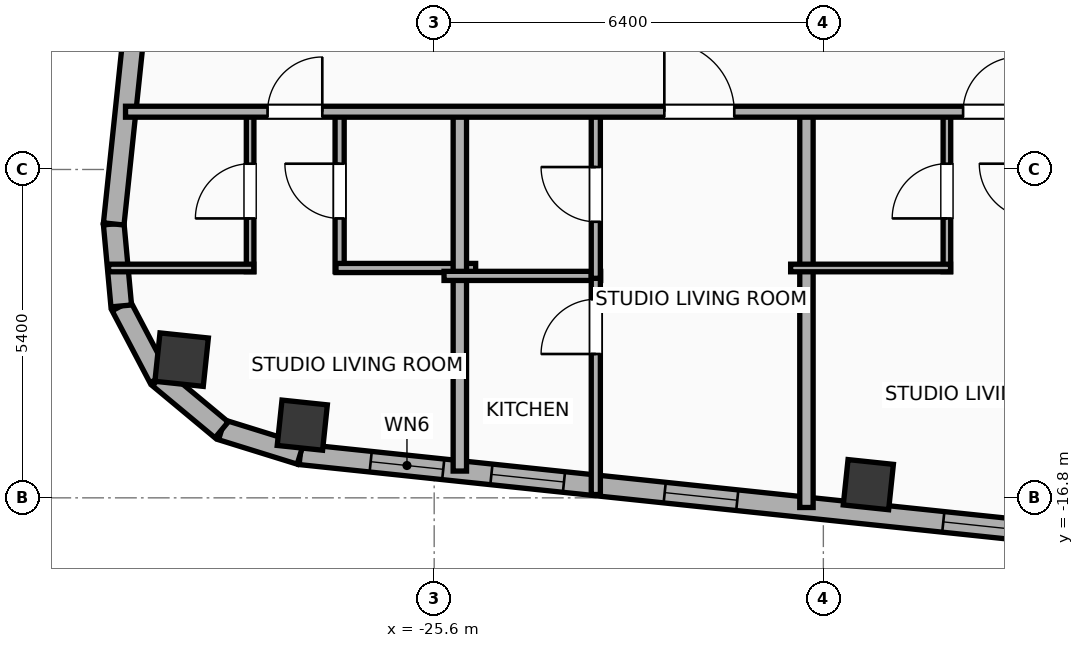
"""IFC4 building model, lengths in metres.
Left out: names, types, materials, properties, quantities, classifications, styles, units other than length and angle.
Written with IfcOpenShell. Run it as: python <this file> out.ifc"""

import sys

from ifc_helpers import new_model, si_unit, direction, frame, frame_2d, origin, origin_2d, place, context, subcontext, project, spatial, rectangle, hollow_rectangle, hollow_circle, extrude, element, fill, save


model = new_model("IFC4")
c1 = context("Model", 3, precision=1e-05, world=origin(), true_north=direction((0.0, 1.0)))
c2 = subcontext(c1, "Body", "Model", "MODEL_VIEW")
j1 = project(units=[si_unit("LENGTHUNIT", "METRE"), si_unit("PLANEANGLEUNIT", "RADIAN")], contexts=[c1])
p1 = place(None, origin())
s1 = spatial("IfcSite", under=j1, at=p1, CompositionType="ELEMENT")
p2 = place(p1, origin())
s2 = spatial("IfcBuilding", under=s1, at=p2, CompositionType="ELEMENT")
p3 = place(p2, frame((0.0, 0.0, 306.8)))
s3 = spatial("IfcBuildingStorey", under=s2, at=p3, CompositionType="ELEMENT", Elevation=306.8)
for number, where, z_axis, x_axis in (
    (1, (-27.769, -15.604, 0.0), (0.0, 0.0, 1.0), (0.995, -0.105, 0.0)),
    (2, (-18.46, -16.583, 0.0), (0.0, 0.0, 1.0), (0.995, -0.105, 0.0)),
):
    element("IfcColumn", number, at=place(p3, frame(where, z_axis=z_axis, x_axis=x_axis)), inside=s3, PredefinedType="COLUMN", context=c2, shape_type="SweptSolid", body=[
        extrude(hollow_rectangle(XDim=0.75, YDim=0.75, WallThickness=0.025, at=origin_2d()), origin(), (0.0, 0.0, 1.0), 3.865),
    ])
p4 = place(p3, frame((-29.753, -14.527, 0.0), z_axis=(0.0, 0.0, 1.0), x_axis=(0.994521895368, -0.104528463268, 0.0)))
e3 = element("IfcColumn", 3, at=p4, inside=s3, PredefinedType="COLUMN", context=c2, shape_type="SweptSolid", body=[
    extrude(hollow_circle(Radius=0.4, WallThickness=0.028, at=origin_2d()), origin(), (0.0, 0.0, 1.0), 3.865),
])
p5 = place(p3, frame((18.708, -20.972, 0.0), z_axis=(0.0, 0.0, 1.0), x_axis=(-0.994521888554, 0.104528528102, 0.0)))
e4 = element("IfcWall", 4, at=p5, inside=s3, PredefinedType="ELEMENTEDWALL", context=c2, shape_type="SweptSolid", body=[
    extrude(rectangle(XDim=46.766, YDim=0.34, at=frame_2d((23.383, 0.0))), origin(), (0.0, 0.0, 1.0), 2.39),
])
p6 = place(p5, frame((23.733, 0.0, 0.65)))
e5 = element("IfcOpeningElement", 5, at=p6, cuts=e4, PredefinedType="OPENING", context=c2, shape_type="SweptSolid", body=[
    extrude(rectangle(XDim=2.6, YDim=1.45, at=frame_2d((1.3, 0.725))), frame((0.0, 0.18, 0.0), z_axis=(0.0, -1.0, 0.0), x_axis=(1.0, 0.0, 0.0)), (0.0, 0.0, 1.0), 0.36),
])
p7 = place(p5, frame((44.402, 0.0, 0.55)))
e6 = element("IfcOpeningElement", 6, at=p7, cuts=e4, PredefinedType="OPENING", context=c2, shape_type="SweptSolid", body=[
    extrude(rectangle(XDim=1.2, YDim=1.15, at=frame_2d((0.6, 0.575))), frame((0.0, 0.18, 0.0), z_axis=(0.0, -1.0, 0.0), x_axis=(1.0, 0.0, 0.0)), (0.0, 0.0, 1.0), 0.36),
])
p8 = place(p5, frame((39.54, 0.0, 0.55)))
e7 = element("IfcOpeningElement", 7, at=p8, cuts=e4, PredefinedType="OPENING", context=c2, shape_type="SweptSolid", body=[
    extrude(rectangle(XDim=1.2, YDim=1.15, at=frame_2d((0.6, 0.575))), frame((0.0, 0.18, 0.0), z_axis=(0.0, -1.0, 0.0), x_axis=(1.0, 0.0, 0.0)), (0.0, 0.0, 1.0), 0.36),
])
p9 = place(p5, frame((42.406, 0.0, 0.55)))
e8 = element("IfcOpeningElement", 8, at=p9, cuts=e4, PredefinedType="OPENING", context=c2, shape_type="SweptSolid", body=[
    extrude(rectangle(XDim=1.2, YDim=1.15, at=frame_2d((0.6, 0.575))), frame((0.0, 0.18, 0.0), z_axis=(0.0, -1.0, 0.0), x_axis=(1.0, 0.0, 0.0)), (0.0, 0.0, 1.0), 0.36),
])
p10 = place(p5, frame((34.933, 0.0, 0.55)))
e9 = element("IfcOpeningElement", 9, at=p10, cuts=e4, PredefinedType="OPENING", context=c2, shape_type="SweptSolid", body=[
    extrude(rectangle(XDim=1.2, YDim=1.15, at=frame_2d((0.6, 0.575))), frame((0.0, 0.18, 0.0), z_axis=(0.0, -1.0, 0.0), x_axis=(1.0, 0.0, 0.0)), (0.0, 0.0, 1.0), 0.36),
])
p11 = place(p5, frame((28.631, 0.0, 0.55)))
e10 = element("IfcOpeningElement", 10, at=p11, cuts=e4, PredefinedType="OPENING", context=c2, shape_type="SweptSolid", body=[
    extrude(rectangle(XDim=1.2, YDim=1.15, at=frame_2d((0.6, 0.575))), frame((0.0, 0.18, 0.0), z_axis=(0.0, -1.0, 0.0), x_axis=(1.0, 0.0, 0.0)), (0.0, 0.0, 1.0), 0.36),
])
p12 = place(p5, frame((30.896, 0.0, 0.55)))
e11 = element("IfcOpeningElement", 11, at=p12, cuts=e4, PredefinedType="OPENING", context=c2, shape_type="SweptSolid", body=[
    extrude(rectangle(XDim=1.2, YDim=1.15, at=frame_2d((0.6, 0.575))), frame((0.0, 0.18, 0.0), z_axis=(0.0, -1.0, 0.0), x_axis=(1.0, 0.0, 0.0)), (0.0, 0.0, 1.0), 0.36),
])
p13 = place(p5, frame((7.501, 0.0, 0.55)))
e12 = element("IfcOpeningElement", 12, at=p13, cuts=e4, PredefinedType="OPENING", context=c2, shape_type="SweptSolid", body=[
    extrude(rectangle(XDim=1.2, YDim=1.15, at=frame_2d((0.6, 0.575))), frame((0.0, 0.18, 0.0), z_axis=(0.0, -1.0, 0.0), x_axis=(1.0, 0.0, 0.0)), (0.0, 0.0, 1.0), 0.36),
])
p14 = place(p5, frame((4.159, 0.0, 0.55)))
e13 = element("IfcOpeningElement", 13, at=p14, cuts=e4, PredefinedType="OPENING", context=c2, shape_type="SweptSolid", body=[
    extrude(rectangle(XDim=1.2, YDim=1.15, at=frame_2d((0.6, 0.575))), frame((0.0, 0.18, 0.0), z_axis=(0.0, -1.0, 0.0), x_axis=(1.0, 0.0, 0.0)), (0.0, 0.0, 1.0), 0.36),
])
p15 = place(p5, frame((1.369, 0.0, 0.55)))
e14 = element("IfcOpeningElement", 14, at=p15, cuts=e4, PredefinedType="OPENING", context=c2, shape_type="SweptSolid", body=[
    extrude(rectangle(XDim=1.2, YDim=1.15, at=frame_2d((0.6, 0.575))), frame((0.0, 0.18, 0.0), z_axis=(0.0, -1.0, 0.0), x_axis=(1.0, 0.0, 0.0)), (0.0, 0.0, 1.0), 0.36),
])
p16 = place(p5, frame((20.254, 0.0, 0.55)))
e15 = element("IfcOpeningElement", 15, at=p16, cuts=e4, PredefinedType="OPENING", context=c2, shape_type="SweptSolid", body=[
    extrude(rectangle(XDim=1.2, YDim=1.15, at=frame_2d((0.6, 0.575))), frame((0.0, 0.18, 0.0), z_axis=(0.0, -1.0, 0.0), x_axis=(1.0, 0.0, 0.0)), (0.0, 0.0, 1.0), 0.36),
])
p17 = place(p5, frame((16.172, 0.0, 0.55)))
e16 = element("IfcOpeningElement", 16, at=p17, cuts=e4, PredefinedType="OPENING", context=c2, shape_type="SweptSolid", body=[
    extrude(rectangle(XDim=1.2, YDim=1.15, at=frame_2d((0.6, 0.575))), frame((0.0, 0.18, 0.0), z_axis=(0.0, -1.0, 0.0), x_axis=(1.0, 0.0, 0.0)), (0.0, 0.0, 1.0), 0.36),
])
p18 = place(p5, frame((12.11, 0.0, 0.55)))
e17 = element("IfcOpeningElement", 17, at=p18, cuts=e4, PredefinedType="OPENING", context=c2, shape_type="SweptSolid", body=[
    extrude(rectangle(XDim=1.2, YDim=1.15, at=frame_2d((0.6, 0.575))), frame((0.0, 0.18, 0.0), z_axis=(0.0, -1.0, 0.0), x_axis=(1.0, 0.0, 0.0)), (0.0, 0.0, 1.0), 0.36),
])
p19 = place(p3, frame((-27.802, -16.084, 0.0), z_axis=(0.0, 0.0, 1.0), x_axis=(-0.955007802701, 0.296580674994, 0.0)))
e18 = element("IfcWall", 18, at=p19, inside=s3, PredefinedType="ELEMENTEDWALL", context=c2, shape_type="SweptSolid", body=[
    extrude(rectangle(XDim=1.354, YDim=0.34, at=frame_2d((0.677, 0.0))), origin(), (0.0, 0.0, 1.0), 2.39),
])
p20 = place(p3, frame((-29.096, -15.682, 0.0), z_axis=(0.0, 0.0, 1.0), x_axis=(-0.768864427906, 0.639411832469, 0.0)))
e19 = element("IfcWall", 19, at=p20, inside=s3, PredefinedType="ELEMENTEDWALL", context=c2, shape_type="SweptSolid", body=[
    extrude(rectangle(XDim=1.337, YDim=0.34, at=frame_2d((0.668, 0.0))), origin(), (0.0, 0.0, 1.0), 2.39),
])
p21 = place(p3, frame((-30.124, -14.827, 0.0), z_axis=(0.0, 0.0, 1.0), x_axis=(-0.465528132217, 0.885033083062, 0.0)))
e20 = element("IfcWall", 20, at=p21, inside=s3, PredefinedType="ELEMENTEDWALL", context=c2, shape_type="SweptSolid", body=[
    extrude(rectangle(XDim=1.337, YDim=0.34, at=frame_2d((0.668, 0.0))), origin(), (0.0, 0.0, 1.0), 3.5),
])
p22 = place(p3, frame((-30.746, -13.644, 0.0), z_axis=(0.0, 0.0, 1.0), x_axis=(-0.091592370975, 0.995796584438, 0.0)))
e21 = element("IfcWall", 21, at=p22, inside=s3, PredefinedType="ELEMENTEDWALL", context=c2, shape_type="SweptSolid", body=[
    extrude(rectangle(XDim=1.354, YDim=0.34, at=frame_2d((0.677, 0.0))), origin(), (0.0, 0.0, 1.0), 3.5),
])
p23 = place(p3, frame((-30.87, -12.296, 0.0), z_axis=(0.0, 0.0, 1.0), x_axis=(0.104533282919, 0.994521388791, 0.0)))
e22 = element("IfcWall", 22, at=p23, inside=s3, PredefinedType="ELEMENTEDWALL", context=c2, shape_type="SweptSolid", body=[
    extrude(rectangle(XDim=30.366, YDim=0.34, at=frame_2d((15.183, 0.0))), origin(), (0.0, 0.0, 1.0), 2.39),
])
p24 = place(p23, frame((5.442, 0.0, 0.65)))
e23 = element("IfcOpeningElement", 23, at=p24, cuts=e22, PredefinedType="OPENING", context=c2, shape_type="SweptSolid", body=[
    extrude(rectangle(XDim=2.6, YDim=1.45, at=frame_2d((1.3, 0.725))), frame((0.0, 0.18, 0.0), z_axis=(0.0, -1.0, 0.0), x_axis=(1.0, 0.0, 0.0)), (0.0, 0.0, 1.0), 0.36),
])
p25 = place(p23, frame((23.125, 0.0, 0.65)))
e24 = element("IfcOpeningElement", 24, at=p25, cuts=e22, PredefinedType="OPENING", context=c2, shape_type="SweptSolid", body=[
    extrude(rectangle(XDim=2.6, YDim=1.45, at=frame_2d((1.3, 0.725))), frame((0.0, 0.18, 0.0), z_axis=(0.0, -1.0, 0.0), x_axis=(1.0, 0.0, 0.0)), (0.0, 0.0, 1.0), 0.36),
])
p26 = place(p23, frame((27.192, 0.0, 0.55)))
e25 = element("IfcOpeningElement", 25, at=p26, cuts=e22, PredefinedType="OPENING", context=c2, shape_type="SweptSolid", body=[
    extrude(rectangle(XDim=1.2, YDim=1.15, at=frame_2d((0.6, 0.575))), frame((0.0, 0.18, 0.0), z_axis=(0.0, -1.0, 0.0), x_axis=(1.0, 0.0, 0.0)), (0.0, 0.0, 1.0), 0.36),
])
p27 = place(p23, frame((16.311, 0.0, 0.55)))
e26 = element("IfcOpeningElement", 26, at=p27, cuts=e22, PredefinedType="OPENING", context=c2, shape_type="SweptSolid", body=[
    extrude(rectangle(XDim=1.2, YDim=1.15, at=frame_2d((0.6, 0.575))), frame((0.0, 0.18, 0.0), z_axis=(0.0, -1.0, 0.0), x_axis=(1.0, 0.0, 0.0)), (0.0, 0.0, 1.0), 0.36),
])
p28 = place(p3, frame((-28.627, -13.08, 0.0), z_axis=(0.0, 0.0, 1.0), x_axis=(0.0, 1.0, 0.0)))
e27 = element("IfcWall", 27, at=p28, inside=s3, PredefinedType="PARTITIONING", context=c2, shape_type="SweptSolid", body=[
    extrude(rectangle(XDim=2.65, YDim=0.125, at=frame_2d((1.325, 0.0))), origin(), (0.0, 0.0, 1.0), 3.5),
])
p29 = place(p28, frame((0.875, 0.0, 0.0)))
e28 = element("IfcOpeningElement", 28, at=p29, cuts=e27, PredefinedType="OPENING", context=c2, shape_type="SweptSolid", body=[
    extrude(rectangle(XDim=0.9, YDim=2.05, at=frame_2d((0.45, 1.025))), frame((0.0, 0.073, 0.0), z_axis=(0.0, -1.0, 0.0), x_axis=(1.0, 0.0, 0.0)), (0.0, 0.0, 1.0), 0.145),
])
p30 = place(p3, frame((-27.155, -13.08, 0.0), z_axis=(0.0, 0.0, 1.0), x_axis=(0.0, 1.0, 0.0)))
e29 = element("IfcWall", 29, at=p30, inside=s3, PredefinedType="PLUMBINGWALL", context=c2, shape_type="SweptSolid", body=[
    extrude(rectangle(XDim=2.65, YDim=0.15, at=frame_2d((1.325, 0.0))), origin(), (0.0, 0.0, 1.0), 3.5),
])
p31 = place(p30, frame((0.875, 0.0, 0.0)))
e30 = element("IfcOpeningElement", 30, at=p31, cuts=e29, PredefinedType="OPENING", context=c2, shape_type="SweptSolid", body=[
    extrude(rectangle(XDim=0.9, YDim=2.05, at=frame_2d((0.45, 1.025))), frame((0.0, 0.085, 0.0), z_axis=(0.0, -1.0, 0.0), x_axis=(1.0, 0.0, 0.0)), (0.0, 0.0, 1.0), 0.17),
])
p32 = place(p3, frame((-30.954, -13.02, 0.0), z_axis=(0.0, 0.0, 1.0), x_axis=(1.0, 0.0, 0.0)))
e31 = element("IfcWall", 31, at=p32, inside=s3, PredefinedType="PARTITIONING", context=c2, shape_type="SweptSolid", body=[
    extrude(rectangle(XDim=2.387, YDim=0.125, at=frame_2d((1.194, 0.0))), origin(), (0.0, 0.0, 1.0), 3.5),
])
p33 = place(p3, frame((-27.215, -13.02, 0.0), z_axis=(0.0, 0.0, 1.0), x_axis=(1.0, 0.0, 0.0)))
e32 = element("IfcWall", 32, at=p33, inside=s3, PredefinedType="PLUMBINGWALL", context=c2, shape_type="SweptSolid", body=[
    extrude(rectangle(XDim=2.297, YDim=0.15, at=frame_2d((1.148, 0.0))), origin(), (0.0, 0.0, 1.0), 3.5),
])
p34 = place(p3, frame((-25.178, -16.36, 0.0), z_axis=(0.0, 0.0, 1.0), x_axis=(0.0, 1.0, 0.0)))
e33 = element("IfcWall", 33, at=p34, inside=s3, PredefinedType="PARTITIONING", context=c2, shape_type="SweptSolid", body=[
    extrude(rectangle(XDim=5.99, YDim=0.22, at=frame_2d((2.995, 0.0))), origin(), (0.0, 0.0, 1.0), 3.5),
])
p35 = place(p3, frame((-25.438, -13.15, 0.0), z_axis=(0.0, 0.0, 1.0), x_axis=(1.0, 0.0, 0.0)))
e34 = element("IfcWall", 34, at=p35, inside=s3, PredefinedType="PLUMBINGWALL", context=c2, shape_type="SweptSolid", body=[
    extrude(rectangle(XDim=2.576, YDim=0.15, at=frame_2d((1.288, 0.0))), origin(), (0.0, 0.0, 1.0), 3.5),
])
p36 = place(p3, frame((-22.942, -16.745, 0.0), z_axis=(0.0, 0.0, 1.0), x_axis=(0.0, 1.0, 0.0)))
e35 = element("IfcWall", 35, at=p36, inside=s3, PredefinedType="PLUMBINGWALL", context=c2, shape_type="SweptSolid", body=[
    extrude(rectangle(XDim=3.635, YDim=0.15, at=frame_2d((1.818, 0.0))), origin(), (0.0, 0.0, 1.0), 3.5),
])
p37 = place(p36, frame((2.311, 0.0, 0.0)))
e36 = element("IfcOpeningElement", 36, at=p37, cuts=e35, PredefinedType="OPENING", context=c2, shape_type="SweptSolid", body=[
    extrude(rectangle(XDim=0.9, YDim=2.05, at=frame_2d((0.45, 1.025))), frame((0.0, 0.085, 0.0), z_axis=(0.0, -1.0, 0.0), x_axis=(1.0, 0.0, 0.0)), (0.0, 0.0, 1.0), 0.17),
])
p38 = place(p3, frame((-22.942, -13.19, 0.0), z_axis=(0.0, 0.0, 1.0), x_axis=(0.0, 1.0, 0.0)))
e37 = element("IfcWall", 37, at=p38, inside=s3, PredefinedType="PLUMBINGWALL", context=c2, shape_type="SweptSolid", body=[
    extrude(rectangle(XDim=2.76, YDim=0.15, at=frame_2d((1.38, 0.0))), origin(), (0.0, 0.0, 1.0), 3.5),
])
p39 = place(p38, frame((0.93, 0.0, 0.0)))
e38 = element("IfcOpeningElement", 38, at=p39, cuts=e37, PredefinedType="OPENING", context=c2, shape_type="SweptSolid", body=[
    extrude(rectangle(XDim=0.9, YDim=2.05, at=frame_2d((0.45, 1.025))), frame((0.0, 0.085, 0.0), z_axis=(0.0, -1.0, 0.0), x_axis=(1.0, 0.0, 0.0)), (0.0, 0.0, 1.0), 0.17),
])
p40 = place(p3, frame((-19.478, -16.959, 0.0), z_axis=(0.0, 0.0, 1.0), x_axis=(0.0, 1.0, 0.0)))
e39 = element("IfcWall", 39, at=p40, inside=s3, PredefinedType="PARTITIONING", context=c2, shape_type="SweptSolid", body=[
    extrude(rectangle(XDim=6.589, YDim=0.22, at=frame_2d((3.294, 0.0))), origin(), (0.0, 0.0, 1.0), 3.5),
])
p41 = place(p3, frame((-17.168, -13.08, 0.0), z_axis=(0.0, 0.0, 1.0), x_axis=(0.0, 1.0, 0.0)))
e40 = element("IfcWall", 40, at=p41, inside=s3, PredefinedType="PARTITIONING", context=c2, shape_type="SweptSolid", body=[
    extrude(rectangle(XDim=2.65, YDim=0.125, at=frame_2d((1.325, 0.0))), origin(), (0.0, 0.0, 1.0), 3.5),
])
p42 = place(p41, frame((0.875, 0.0, 0.0)))
e41 = element("IfcOpeningElement", 41, at=p42, cuts=e40, PredefinedType="OPENING", context=c2, shape_type="SweptSolid", body=[
    extrude(rectangle(XDim=0.9, YDim=2.05, at=frame_2d((0.45, 1.025))), frame((0.0, 0.073, 0.0), z_axis=(0.0, -1.0, 0.0), x_axis=(1.0, 0.0, 0.0)), (0.0, 0.0, 1.0), 0.145),
])
p43 = place(p3, frame((-19.738, -13.02, 0.0), z_axis=(0.0, 0.0, 1.0), x_axis=(1.0, 0.0, 0.0)))
e42 = element("IfcWall", 42, at=p43, inside=s3, PredefinedType="PARTITIONING", context=c2, shape_type="SweptSolid", body=[
    extrude(rectangle(XDim=2.63, YDim=0.125, at=frame_2d((1.315, 0.0))), origin(), (0.0, 0.0, 1.0), 3.5),
])
p44 = place(p3, frame((-30.676, -10.45, 0.0), z_axis=(0.0, 0.0, 1.0), x_axis=(1.0, 0.0, 0.0)))
e43 = element("IfcWall", 43, at=p44, inside=s3, PredefinedType="PARTITIONING", context=c2, shape_type="SweptSolid", body=[
    extrude(rectangle(XDim=22.596, YDim=0.18, at=frame_2d((11.298, 0.0))), origin(), (0.0, 0.0, 1.0), 3.5),
])
p45 = place(p44, frame((2.336, 0.0, 0.0)))
e44 = element("IfcOpeningElement", 44, at=p45, cuts=e43, PredefinedType="OPENING", context=c2, shape_type="SweptSolid", body=[
    extrude(rectangle(XDim=0.9, YDim=2.05, at=frame_2d((0.45, 1.025))), frame((0.0, 0.1, 0.0), z_axis=(0.0, -1.0, 0.0), x_axis=(1.0, 0.0, 0.0)), (0.0, 0.0, 1.0), 0.2),
])
p46 = place(p44, frame((8.861, 0.0, 0.0)))
e45 = element("IfcOpeningElement", 45, at=p46, cuts=e43, PredefinedType="OPENING", context=c2, shape_type="SweptSolid", body=[
    extrude(rectangle(XDim=1.15, YDim=2.05, at=frame_2d((0.575, 1.025))), frame((0.0, 0.1, 0.0), z_axis=(0.0, -1.0, 0.0), x_axis=(1.0, 0.0, 0.0)), (0.0, 0.0, 1.0), 0.2),
])
p47 = place(p44, frame((13.774, 0.0, 0.0)))
e46 = element("IfcOpeningElement", 46, at=p47, cuts=e43, PredefinedType="OPENING", context=c2, shape_type="SweptSolid", body=[
    extrude(rectangle(XDim=0.9, YDim=2.05, at=frame_2d((0.45, 1.025))), frame((0.0, 0.1, 0.0), z_axis=(0.0, -1.0, 0.0), x_axis=(1.0, 0.0, 0.0)), (0.0, 0.0, 1.0), 0.2),
])
p48 = place(p44, frame((20.306, 0.0, 0.0)))
e47 = element("IfcOpeningElement", 47, at=p48, cuts=e43, PredefinedType="OPENING", context=c2, shape_type="SweptSolid", body=[
    extrude(rectangle(XDim=1.15, YDim=2.05, at=frame_2d((0.575, 1.025))), frame((0.0, 0.1, 0.0), z_axis=(0.0, -1.0, 0.0), x_axis=(1.0, 0.0, 0.0)), (0.0, 0.0, 1.0), 0.2),
])
p49 = place(p7, origin())
e48 = element("IfcWindow", 48, at=p49, inside=s3, PartitioningType="SINGLE_PANEL", PredefinedType="WINDOW", context=c2, shape_type="SweptSolid", body=[
    extrude(rectangle(XDim=1.2, YDim=1.15, at=frame_2d((0.6, 0.575))), frame((0.0, 0.03, 0.0), z_axis=(0.0, -1.0, 0.0), x_axis=(1.0, 0.0, 0.0)), (0.0, 0.0, 1.0), 0.06),
])
fill(e6, e48)
p50 = place(p8, origin())
e49 = element("IfcWindow", 49, at=p50, inside=s3, PartitioningType="SINGLE_PANEL", PredefinedType="WINDOW", context=c2, shape_type="SweptSolid", body=[
    extrude(rectangle(XDim=1.2, YDim=1.15, at=frame_2d((0.6, 0.575))), frame((0.0, 0.03, 0.0), z_axis=(0.0, -1.0, 0.0), x_axis=(1.0, 0.0, 0.0)), (0.0, 0.0, 1.0), 0.06),
])
fill(e7, e49)
p51 = place(p9, origin())
e50 = element("IfcWindow", 50, at=p51, inside=s3, PartitioningType="SINGLE_PANEL", PredefinedType="WINDOW", context=c2, shape_type="SweptSolid", body=[
    extrude(rectangle(XDim=1.2, YDim=1.15, at=frame_2d((0.6, 0.575))), frame((0.0, 0.03, 0.0), z_axis=(0.0, -1.0, 0.0), x_axis=(1.0, 0.0, 0.0)), (0.0, 0.0, 1.0), 0.06),
])
fill(e8, e50)
p52 = place(p10, origin())
e51 = element("IfcWindow", 51, at=p52, inside=s3, PartitioningType="SINGLE_PANEL", PredefinedType="WINDOW", context=c2, shape_type="SweptSolid", body=[
    extrude(rectangle(XDim=1.2, YDim=1.15, at=frame_2d((0.6, 0.575))), frame((0.0, 0.03, 0.0), z_axis=(0.0, -1.0, 0.0), x_axis=(1.0, 0.0, 0.0)), (0.0, 0.0, 1.0), 0.06),
])
fill(e9, e51)
p53 = place(p29, origin())
e52 = element("IfcDoor", 52, at=p53, inside=s3, OperationType="SINGLE_SWING_LEFT", PredefinedType="DOOR", context=c2, shape_type="SweptSolid", body=[
    extrude(rectangle(XDim=0.9, YDim=2.05, at=frame_2d((0.45, 1.025))), frame((0.0, 0.025, 0.0), z_axis=(0.0, -1.0, 0.0), x_axis=(1.0, 0.0, 0.0)), (0.0, 0.0, 1.0), 0.05),
])
fill(e28, e52)
p54 = place(p31, origin())
e53 = element("IfcDoor", 53, at=p54, inside=s3, OperationType="SINGLE_SWING_RIGHT", PredefinedType="DOOR", context=c2, shape_type="SweptSolid", body=[
    extrude(rectangle(XDim=0.9, YDim=2.05, at=frame_2d((0.45, 1.025))), frame((0.0, 0.025, 0.0), z_axis=(0.0, -1.0, 0.0), x_axis=(1.0, 0.0, 0.0)), (0.0, 0.0, 1.0), 0.05),
])
fill(e30, e53)
p55 = place(p37, origin())
e54 = element("IfcDoor", 54, at=p55, inside=s3, OperationType="SINGLE_SWING_LEFT", PredefinedType="DOOR", context=c2, shape_type="SweptSolid", body=[
    extrude(rectangle(XDim=0.9, YDim=2.05, at=frame_2d((0.45, 1.025))), frame((0.0, 0.025, 0.0), z_axis=(0.0, -1.0, 0.0), x_axis=(1.0, 0.0, 0.0)), (0.0, 0.0, 1.0), 0.05),
])
fill(e36, e54)
p56 = place(p39, origin())
e55 = element("IfcDoor", 55, at=p56, inside=s3, OperationType="SINGLE_SWING_RIGHT", PredefinedType="DOOR", context=c2, shape_type="SweptSolid", body=[
    extrude(rectangle(XDim=0.9, YDim=2.05, at=frame_2d((0.45, 1.025))), frame((0.0, 0.025, 0.0), z_axis=(0.0, -1.0, 0.0), x_axis=(1.0, 0.0, 0.0)), (0.0, 0.0, 1.0), 0.05),
])
fill(e38, e55)
p57 = place(p42, origin())
e56 = element("IfcDoor", 56, at=p57, inside=s3, OperationType="SINGLE_SWING_LEFT", PredefinedType="DOOR", context=c2, shape_type="SweptSolid", body=[
    extrude(rectangle(XDim=0.9, YDim=2.05, at=frame_2d((0.45, 1.025))), frame((0.0, 0.025, 0.0), z_axis=(0.0, -1.0, 0.0), x_axis=(1.0, 0.0, 0.0)), (0.0, 0.0, 1.0), 0.05),
])
fill(e41, e56)
p58 = place(p45, origin())
e57 = element("IfcDoor", 57, at=p58, inside=s3, OperationType="SINGLE_SWING_RIGHT", PredefinedType="DOOR", context=c2, shape_type="SweptSolid", body=[
    extrude(rectangle(XDim=0.9, YDim=2.05, at=frame_2d((0.45, 1.025))), frame((0.0, 0.025, 0.0), z_axis=(0.0, -1.0, 0.0), x_axis=(1.0, 0.0, 0.0)), (0.0, 0.0, 1.0), 0.05),
])
fill(e44, e57)
p59 = place(p46, origin())
e58 = element("IfcDoor", 58, at=p59, inside=s3, OperationType="SINGLE_SWING_LEFT", PredefinedType="DOOR", context=c2, shape_type="SweptSolid", body=[
    extrude(rectangle(XDim=1.15, YDim=2.05, at=frame_2d((0.575, 1.025))), frame((0.0, 0.025, 0.0), z_axis=(0.0, -1.0, 0.0), x_axis=(1.0, 0.0, 0.0)), (0.0, 0.0, 1.0), 0.05),
])
fill(e45, e58)
p60 = place(p47, origin())
e59 = element("IfcDoor", 59, at=p60, inside=s3, OperationType="SINGLE_SWING_RIGHT", PredefinedType="DOOR", context=c2, shape_type="SweptSolid", body=[
    extrude(rectangle(XDim=0.9, YDim=2.05, at=frame_2d((0.45, 1.025))), frame((0.0, 0.025, 0.0), z_axis=(0.0, -1.0, 0.0), x_axis=(1.0, 0.0, 0.0)), (0.0, 0.0, 1.0), 0.05),
])
fill(e46, e59)
save(model, sys.argv[1])
